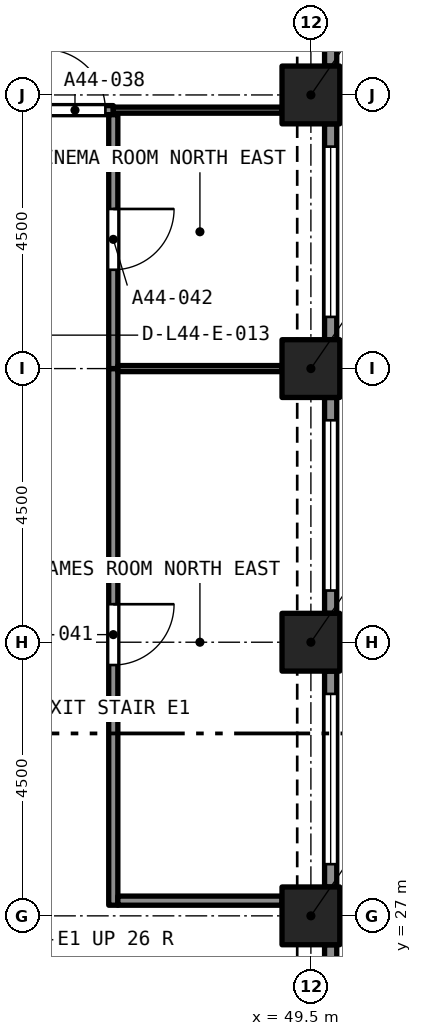
"""IFC4 building model, lengths in metres.
Left out: names, types, materials, properties, quantities, classifications, styles, units other than length and angle.
Written with IfcOpenShell. Run it as: python <this file> out.ifc"""

import sys

from ifc_helpers import new_model, si_unit, direction, frame, frame_2d, origin, origin_2d, place, context, subcontext, project, spatial, rectangle, extrude, element, fill, save


model = new_model("IFC4")
c1 = context("Model", 3, precision=1e-05, world=origin(), true_north=direction((0.0, 1.0)))
c2 = subcontext(c1, "Body", "Model", "MODEL_VIEW")
j1 = project(units=[si_unit("LENGTHUNIT", "METRE"), si_unit("PLANEANGLEUNIT", "RADIAN")], contexts=[c1])
p1 = place(None, origin())
s1 = spatial("IfcSite", under=j1, at=p1, CompositionType="ELEMENT")
p2 = place(p1, origin())
s2 = spatial("IfcBuilding", under=s1, at=p2, CompositionType="ELEMENT")
p3 = place(p2, frame((0.0, 0.0, 159.4)))
s3 = spatial("IfcBuildingStorey", under=s2, at=p3, CompositionType="ELEMENT", Elevation=159.4)
for number, where, z_axis, x_axis in (
    (1, (49.5, 27.0, 0.0), (0.0, 0.0, 1.0), (1.0, 0.0, 0.0)),
    (2, (49.5, 31.5, 0.0), (0.0, 0.0, 1.0), (1.0, 0.0, 0.0)),
    (3, (49.5, 36.0, 0.0), (0.0, 0.0, 1.0), (1.0, 0.0, 0.0)),
    (4, (49.5, 40.5, 0.0), (0.0, 0.0, 1.0), (1.0, 0.0, 0.0)),
):
    element("IfcColumn", number, at=place(p3, frame(where, z_axis=z_axis, x_axis=x_axis)), inside=s3, PredefinedType="COLUMN", context=c2, shape_type="SweptSolid", body=[
        extrude(rectangle(XDim=0.95, YDim=0.95, at=origin_2d()), origin(), (0.0, 0.0, 1.0), 4.4),
    ])
p4 = place(p3, frame((49.825, 26.525, 0.0), z_axis=(0.0, 0.0, 1.0), x_axis=(0.0, -1.0, 0.0)))
e5 = element("IfcWall", 5, at=p4, inside=s3, PredefinedType="SOLIDWALL", context=c2, shape_type="SweptSolid", body=[
    extrude(rectangle(XDim=3.55, YDim=0.2, at=frame_2d((1.775, 0.0))), origin(), (0.0, 0.0, 1.0), 4.4),
])
p5 = place(p4, frame((0.375, 0.0, 0.45)))
e6 = element("IfcOpeningElement", 6, at=p5, cuts=e5, PredefinedType="OPENING", context=c2, shape_type="SweptSolid", body=[
    extrude(rectangle(XDim=2.8, YDim=2.55, at=frame_2d((1.4, 1.275))), frame((0.0, 0.11, 0.0), z_axis=(0.0, -1.0, 0.0), x_axis=(1.0, 0.0, 0.0)), (0.0, 0.0, 1.0), 0.22),
])
p6 = place(p3, frame((49.825, 31.025, 0.0), z_axis=(0.0, 0.0, 1.0), x_axis=(0.0, -1.0, 0.0)))
e7 = element("IfcWall", 7, at=p6, inside=s3, PredefinedType="SOLIDWALL", context=c2, shape_type="SweptSolid", body=[
    extrude(rectangle(XDim=3.55, YDim=0.2, at=frame_2d((1.775, 0.0))), origin(), (0.0, 0.0, 1.0), 4.4),
])
p7 = place(p6, frame((0.375, 0.0, 0.45)))
e8 = element("IfcOpeningElement", 8, at=p7, cuts=e7, PredefinedType="OPENING", context=c2, shape_type="SweptSolid", body=[
    extrude(rectangle(XDim=2.8, YDim=2.55, at=frame_2d((1.4, 1.275))), frame((0.0, 0.11, 0.0), z_axis=(0.0, -1.0, 0.0), x_axis=(1.0, 0.0, 0.0)), (0.0, 0.0, 1.0), 0.22),
])
p8 = place(p3, frame((49.825, 35.525, 0.0), z_axis=(0.0, 0.0, 1.0), x_axis=(0.0, -1.0, 0.0)))
e9 = element("IfcWall", 9, at=p8, inside=s3, PredefinedType="SOLIDWALL", context=c2, shape_type="SweptSolid", body=[
    extrude(rectangle(XDim=3.55, YDim=0.2, at=frame_2d((1.775, 0.0))), origin(), (0.0, 0.0, 1.0), 4.4),
])
p9 = place(p8, frame((0.375, 0.0, 0.45)))
e10 = element("IfcOpeningElement", 10, at=p9, cuts=e9, PredefinedType="OPENING", context=c2, shape_type="SweptSolid", body=[
    extrude(rectangle(XDim=2.8, YDim=2.55, at=frame_2d((1.4, 1.275))), frame((0.0, 0.11, 0.0), z_axis=(0.0, -1.0, 0.0), x_axis=(1.0, 0.0, 0.0)), (0.0, 0.0, 1.0), 0.22),
])
p10 = place(p3, frame((49.825, 40.025, 0.0), z_axis=(0.0, 0.0, 1.0), x_axis=(0.0, -1.0, 0.0)))
e11 = element("IfcWall", 11, at=p10, inside=s3, PredefinedType="SOLIDWALL", context=c2, shape_type="SweptSolid", body=[
    extrude(rectangle(XDim=3.55, YDim=0.2, at=frame_2d((1.775, 0.0))), origin(), (0.0, 0.0, 1.0), 4.4),
])
p11 = place(p10, frame((0.375, 0.0, 0.45)))
e12 = element("IfcOpeningElement", 12, at=p11, cuts=e11, PredefinedType="OPENING", context=c2, shape_type="SweptSolid", body=[
    extrude(rectangle(XDim=2.8, YDim=2.55, at=frame_2d((1.4, 1.275))), frame((0.0, 0.11, 0.0), z_axis=(0.0, -1.0, 0.0), x_axis=(1.0, 0.0, 0.0)), (0.0, 0.0, 1.0), 0.22),
])
p12 = place(p3, frame((49.825, 44.525, 0.0), z_axis=(0.0, 0.0, 1.0), x_axis=(0.0, -1.0, 0.0)))
e13 = element("IfcWall", 13, at=p12, inside=s3, PredefinedType="SOLIDWALL", context=c2, shape_type="SweptSolid", body=[
    extrude(rectangle(XDim=3.55, YDim=0.2, at=frame_2d((1.775, 0.0))), origin(), (0.0, 0.0, 1.0), 4.4),
])
p13 = place(p12, frame((0.375, 0.0, 0.45)))
e14 = element("IfcOpeningElement", 14, at=p13, cuts=e13, PredefinedType="OPENING", context=c2, shape_type="SweptSolid", body=[
    extrude(rectangle(XDim=2.8, YDim=2.55, at=frame_2d((1.4, 1.275))), frame((0.0, 0.11, 0.0), z_axis=(0.0, -1.0, 0.0), x_axis=(1.0, 0.0, 0.0)), (0.0, 0.0, 1.0), 0.22),
])
p14 = place(p3, frame((44.75, 40.25, 0.0), z_axis=(0.0, 0.0, 1.0), x_axis=(1.0, 0.0, 0.0)))
e15 = element("IfcWall", 15, at=p14, inside=s3, PredefinedType="PARTITIONING", context=c2, shape_type="SweptSolid", body=[
    extrude(rectangle(XDim=1.5, YDim=0.15, at=frame_2d((0.75, 0.0))), origin(), (0.0, 0.0, 1.0), 4.1),
])
p15 = place(p14, frame((0.37, 0.0, 0.0)))
e16 = element("IfcOpeningElement", 16, at=p15, cuts=e15, PredefinedType="OPENING", context=c2, shape_type="SweptSolid", body=[
    extrude(rectangle(XDim=1.0, YDim=2.1, at=frame_2d((0.5, 1.05))), frame((0.0, 0.085, 0.0), z_axis=(0.0, -1.0, 0.0), x_axis=(1.0, 0.0, 0.0)), (0.0, 0.0, 1.0), 0.17),
])
p16 = place(p3, frame((46.25, 40.25, 0.0), z_axis=(0.0, 0.0, 1.0), x_axis=(1.0, 0.0, 0.0)))
e17 = element("IfcWall", 17, at=p16, inside=s3, PredefinedType="PARTITIONING", context=c2, shape_type="SweptSolid", body=[
    extrude(rectangle(XDim=2.775, YDim=0.1, at=frame_2d((1.387, 0.0))), origin(), (0.0, 0.0, 1.0), 4.1),
])
p17 = place(p3, frame((46.25, 36.0, 0.0), z_axis=(0.0, 0.0, 1.0), x_axis=(0.0, -1.0, 0.0)))
e18 = element("IfcWall", 18, at=p17, inside=s3, PredefinedType="PARTITIONING", context=c2, shape_type="SweptSolid", body=[
    extrude(rectangle(XDim=8.825, YDim=0.15, at=frame_2d((4.413, 0.0))), origin(), (0.0, 0.0, 1.0), 4.1),
])
p18 = place(p17, frame((3.875, 0.0, 0.0)))
e19 = element("IfcOpeningElement", 19, at=p18, cuts=e18, PredefinedType="OPENING", context=c2, shape_type="SweptSolid", body=[
    extrude(rectangle(XDim=1.0, YDim=2.1, at=frame_2d((0.5, 1.05))), frame((0.0, 0.085, 0.0), z_axis=(0.0, -1.0, 0.0), x_axis=(1.0, 0.0, 0.0)), (0.0, 0.0, 1.0), 0.17),
])
p19 = place(p3, frame((46.325, 27.25, 0.0), z_axis=(0.0, 0.0, 1.0), x_axis=(1.0, 0.0, 0.0)))
e20 = element("IfcWall", 20, at=p19, inside=s3, PredefinedType="PARTITIONING", context=c2, shape_type="SweptSolid", body=[
    extrude(rectangle(XDim=2.7, YDim=0.15, at=frame_2d((1.35, 0.0))), origin(), (0.0, 0.0, 1.0), 4.1),
])
p20 = place(p3, frame((46.25, 40.175, 0.0), z_axis=(0.0, 0.0, 1.0), x_axis=(0.0, -1.0, 0.0)))
e21 = element("IfcWall", 21, at=p20, inside=s3, PredefinedType="PARTITIONING", context=c2, shape_type="SweptSolid", body=[
    extrude(rectangle(XDim=4.175, YDim=0.15, at=frame_2d((2.087, 0.0))), origin(), (0.0, 0.0, 1.0), 4.1),
])
p21 = place(p20, frame((1.55, 0.0, 0.0)))
e22 = element("IfcOpeningElement", 22, at=p21, cuts=e21, PredefinedType="OPENING", context=c2, shape_type="SweptSolid", body=[
    extrude(rectangle(XDim=1.0, YDim=2.1, at=frame_2d((0.5, 1.05))), frame((0.0, 0.085, 0.0), z_axis=(0.0, -1.0, 0.0), x_axis=(1.0, 0.0, 0.0)), (0.0, 0.0, 1.0), 0.17),
])
p22 = place(p3, frame((46.325, 36.0, 0.0), z_axis=(0.0, 0.0, 1.0), x_axis=(1.0, 0.0, 0.0)))
e23 = element("IfcWall", 23, at=p22, inside=s3, PredefinedType="PARTITIONING", context=c2, shape_type="SweptSolid", body=[
    extrude(rectangle(XDim=2.7, YDim=0.1, at=frame_2d((1.35, 0.0))), origin(), (0.0, 0.0, 1.0), 4.1),
])
p23 = place(p7, origin())
e24 = element("IfcWindow", 24, at=p23, inside=s3, PartitioningType="SINGLE_PANEL", PredefinedType="WINDOW", context=c2, shape_type="SweptSolid", body=[
    extrude(rectangle(XDim=2.8, YDim=2.55, at=frame_2d((1.4, 1.275))), frame((0.0, 0.03, 0.0), z_axis=(0.0, -1.0, 0.0), x_axis=(1.0, 0.0, 0.0)), (0.0, 0.0, 1.0), 0.06),
])
fill(e8, e24)
p24 = place(p9, origin())
e25 = element("IfcWindow", 25, at=p24, inside=s3, PartitioningType="SINGLE_PANEL", PredefinedType="WINDOW", context=c2, shape_type="SweptSolid", body=[
    extrude(rectangle(XDim=2.8, YDim=2.55, at=frame_2d((1.4, 1.275))), frame((0.0, 0.03, 0.0), z_axis=(0.0, -1.0, 0.0), x_axis=(1.0, 0.0, 0.0)), (0.0, 0.0, 1.0), 0.06),
])
fill(e10, e25)
p25 = place(p11, origin())
e26 = element("IfcWindow", 26, at=p25, inside=s3, PartitioningType="SINGLE_PANEL", PredefinedType="WINDOW", context=c2, shape_type="SweptSolid", body=[
    extrude(rectangle(XDim=2.8, YDim=2.55, at=frame_2d((1.4, 1.275))), frame((0.0, 0.03, 0.0), z_axis=(0.0, -1.0, 0.0), x_axis=(1.0, 0.0, 0.0)), (0.0, 0.0, 1.0), 0.06),
])
fill(e12, e26)
p26 = place(p15, origin())
e27 = element("IfcDoor", 27, at=p26, inside=s3, OperationType="SINGLE_SWING_RIGHT", PredefinedType="DOOR", context=c2, shape_type="SweptSolid", body=[
    extrude(rectangle(XDim=1.0, YDim=2.1, at=frame_2d((0.5, 1.05))), frame((0.0, 0.025, 0.0), z_axis=(0.0, -1.0, 0.0), x_axis=(1.0, 0.0, 0.0)), (0.0, 0.0, 1.0), 0.05),
])
fill(e16, e27)
p27 = place(p18, origin())
e28 = element("IfcDoor", 28, at=p27, inside=s3, OperationType="SINGLE_SWING_LEFT", PredefinedType="DOOR", context=c2, shape_type="SweptSolid", body=[
    extrude(rectangle(XDim=1.0, YDim=2.1, at=frame_2d((0.5, 1.05))), frame((0.0, 0.025, 0.0), z_axis=(0.0, -1.0, 0.0), x_axis=(1.0, 0.0, 0.0)), (0.0, 0.0, 1.0), 0.05),
])
fill(e19, e28)
p28 = place(p21, origin())
e29 = element("IfcDoor", 29, at=p28, inside=s3, OperationType="SINGLE_SWING_LEFT", PredefinedType="DOOR", context=c2, shape_type="SweptSolid", body=[
    extrude(rectangle(XDim=1.0, YDim=2.1, at=frame_2d((0.5, 1.05))), frame((0.0, 0.025, 0.0), z_axis=(0.0, -1.0, 0.0), x_axis=(1.0, 0.0, 0.0)), (0.0, 0.0, 1.0), 0.05),
])
fill(e22, e29)
save(model, sys.argv[1])
